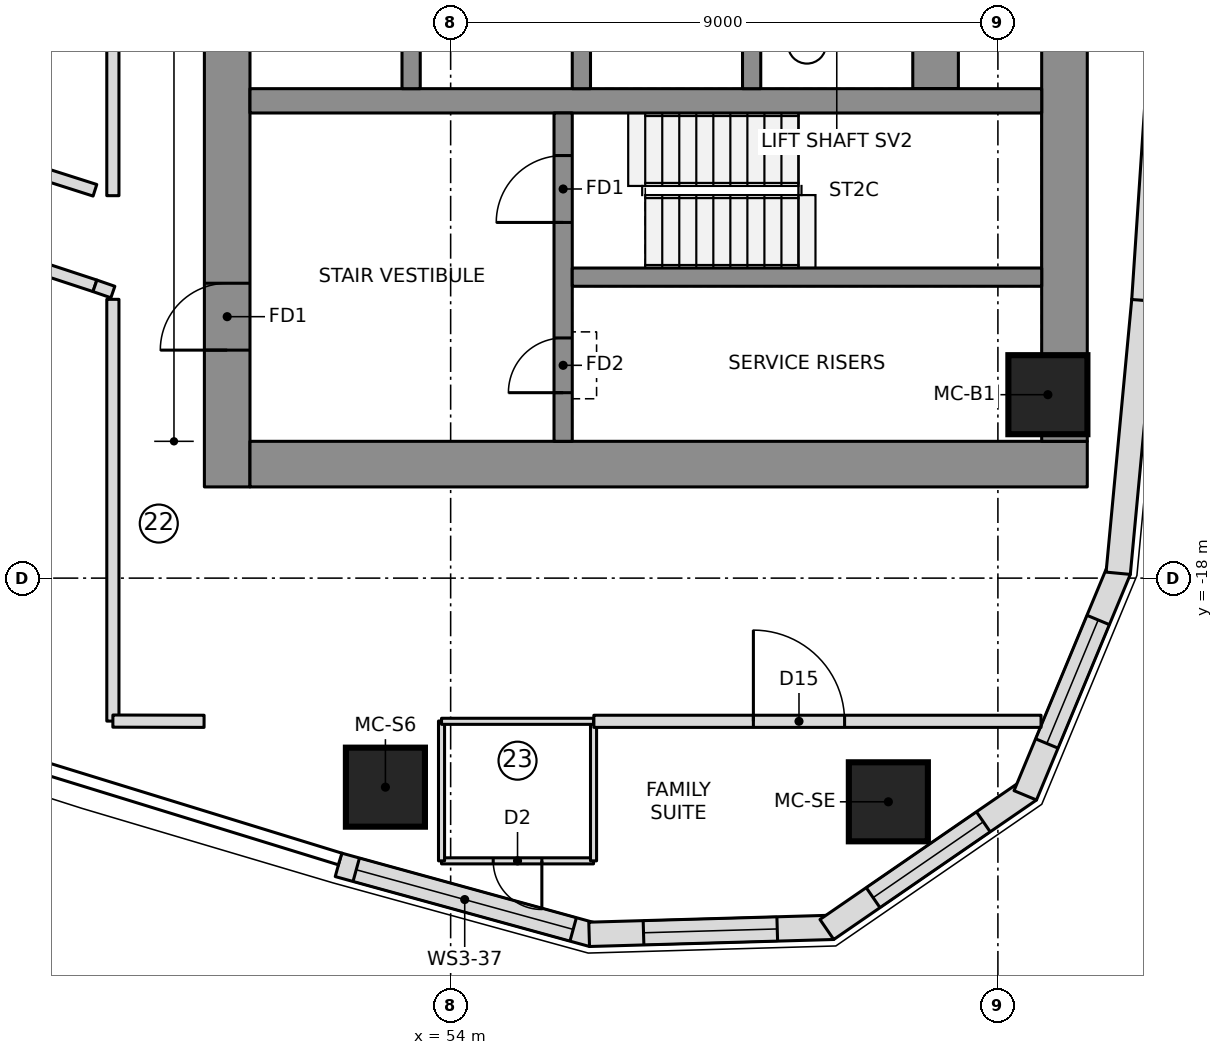
"""IFC4 building model, lengths in metres.
Left out: names, types, materials, properties, quantities, classifications, styles, units other than length and angle.
Written with IfcOpenShell. Run it as: python <this file> out.ifc"""

import sys

from ifc_helpers import new_model, si_unit, direction, frame, frame_2d, origin, origin_2d, place, context, subcontext, project, spatial, polyline, rectangle, outline, extrude, element, fill, save


model = new_model("IFC4")
c1 = context("Model", 3, precision=1e-05, world=origin(), true_north=direction((0.0, 1.0)))
c2 = subcontext(c1, "Body", "Model", "MODEL_VIEW")
j1 = project(units=[si_unit("LENGTHUNIT", "METRE"), si_unit("PLANEANGLEUNIT", "RADIAN")], contexts=[c1])
p1 = place(None, origin())
s1 = spatial("IfcSite", under=j1, at=p1, CompositionType="ELEMENT")
p2 = place(p1, origin())
s2 = spatial("IfcBuilding", under=s1, at=p2, CompositionType="ELEMENT")
p3 = place(p2, frame((0.0, 0.0, 179.05)))
s3 = spatial("IfcBuildingStorey", under=s2, at=p3, CompositionType="ELEMENT", Elevation=179.05)
p4 = place(p3, frame((50.325, -16.5, 0.0), z_axis=(0.0, 0.0, 1.0), x_axis=(0.0, 1.0, 0.0)))
e1 = element("IfcWall", 1, at=p4, inside=s3, PredefinedType="SHEAR", context=c2, shape_type="SweptSolid", body=[
    extrude(rectangle(XDim=9.85, YDim=0.75, at=frame_2d((4.925, 0.0))), origin(), (0.0, 0.0, 1.0), 3.55),
])
p5 = place(p4, frame((2.25, 0.0, 0.0)))
e2 = element("IfcOpeningElement", 2, at=p5, cuts=e1, PredefinedType="OPENING", context=c2, shape_type="SweptSolid", body=[
    extrude(rectangle(XDim=1.1, YDim=2.1, at=frame_2d((0.55, 1.05))), frame((0.0, 0.385, 0.0), z_axis=(0.0, -1.0, 0.0), x_axis=(1.0, 0.0, 0.0)), (0.0, 0.0, 1.0), 0.77),
])
p6 = place(p3, frame((50.7, -16.125, 0.0), z_axis=(0.0, 0.0, 1.0), x_axis=(1.0, 0.0, 0.0)))
e3 = element("IfcWall", 3, at=p6, inside=s3, PredefinedType="SHEAR", context=c2, shape_type="SweptSolid", body=[
    extrude(rectangle(XDim=13.77, YDim=0.75, at=frame_2d((6.885, 0.0))), origin(), (0.0, 0.0, 1.0), 3.55),
])
p7 = place(p3, frame((64.095, -15.75, 0.0), z_axis=(0.0, 0.0, 1.0), x_axis=(0.0, 1.0, 0.0)))
e4 = element("IfcWall", 4, at=p7, inside=s3, PredefinedType="SHEAR", context=c2, shape_type="SweptSolid", body=[
    extrude(rectangle(XDim=7.651, YDim=0.75, at=frame_2d((3.825, 0.0))), origin(), (0.0, 0.0, 1.0), 3.55),
])
p8 = place(p3, frame((61.975, -9.95, 0.0), z_axis=(0.0, 0.0, 1.0), x_axis=(0.0, 1.0, 0.0)))
e5 = element("IfcWall", 5, at=p8, inside=s3, PredefinedType="SHEAR", context=c2, shape_type="SweptSolid", body=[
    extrude(rectangle(XDim=19.9, YDim=0.75, at=frame_2d((9.95, 0.0))), origin(), (0.0, 0.0, 1.0), 3.55),
])
p9 = place(p3, frame((50.7, -10.15, 0.0), z_axis=(0.0, 0.0, 1.0), x_axis=(1.0, 0.0, 0.0)))
e6 = element("IfcWall", 6, at=p9, inside=s3, PredefinedType="SHEAR", context=c2, shape_type="SweptSolid", body=[
    extrude(rectangle(XDim=13.02, YDim=0.4, at=frame_2d((6.51, 0.0))), origin(), (0.0, 0.0, 1.0), 3.55),
])
for number, where, z_axis, x_axis in (
    (7, (53.35, -9.95, 0.0), (0.0, 0.0, 1.0), (0.0, 1.0, 0.0)),
    (8, (56.15, -9.95, 0.0), (0.0, 0.0, 1.0), (0.0, 1.0, 0.0)),
    (9, (58.95, -9.95, 0.0), (0.0, 0.0, 1.0), (0.0, 1.0, 0.0)),
):
    element("IfcWall", number, at=place(p3, frame(where, z_axis=z_axis, x_axis=x_axis)), inside=s3, PredefinedType="SHEAR", context=c2, shape_type="SweptSolid", body=[
        extrude(rectangle(XDim=3.0, YDim=0.3, at=frame_2d((1.5, 0.0))), origin(), (0.0, 0.0, 1.0), 3.55),
    ])
p10 = place(p3, frame((55.85, -15.75, 0.0), z_axis=(0.0, 0.0, 1.0), x_axis=(0.0, 1.0, 0.0)))
e10 = element("IfcWall", 10, at=p10, inside=s3, PredefinedType="SHEAR", context=c2, shape_type="SweptSolid", body=[
    extrude(rectangle(XDim=5.4, YDim=0.3, at=frame_2d((2.7, 0.0))), origin(), (0.0, 0.0, 1.0), 3.55),
])
p11 = place(p10, frame((3.6, 0.0, 0.0)))
e11 = element("IfcOpeningElement", 11, at=p11, cuts=e10, PredefinedType="OPENING", context=c2, shape_type="SweptSolid", body=[
    extrude(rectangle(XDim=1.1, YDim=2.1, at=frame_2d((0.55, 1.05))), frame((0.0, 0.16, 0.0), z_axis=(0.0, -1.0, 0.0), x_axis=(1.0, 0.0, 0.0)), (0.0, 0.0, 1.0), 0.32),
])
p12 = place(p10, frame((0.8, 0.0, 0.0)))
e12 = element("IfcOpeningElement", 12, at=p12, cuts=e10, PredefinedType="OPENING", context=c2, shape_type="SweptSolid", body=[
    extrude(rectangle(XDim=0.9, YDim=2.1, at=frame_2d((0.45, 1.05))), frame((0.0, 0.16, 0.0), z_axis=(0.0, -1.0, 0.0), x_axis=(1.0, 0.0, 0.0)), (0.0, 0.0, 1.0), 0.32),
])
p13 = place(p3, frame((56.0, -13.05, 0.0), z_axis=(0.0, 0.0, 1.0), x_axis=(1.0, 0.0, 0.0)))
e13 = element("IfcWall", 13, at=p13, inside=s3, PredefinedType="SHEAR", context=c2, shape_type="SweptSolid", body=[
    extrude(rectangle(XDim=7.72, YDim=0.3, at=frame_2d((3.86, 0.0))), origin(), (0.0, 0.0, 1.0), 3.55),
])
for number, where, z_axis, x_axis in (
    (14, (52.927, -21.438, 0.0), (0.0, 0.0, 1.0), (1.0, 0.0, 0.0)),
    (15, (61.198, -21.679, 0.0), (0.0, 0.0, 1.0), (1.0, 0.0, 0.0)),
    (16, (63.822, -14.983, 0.0), (0.0, 0.0, 1.0), (1.0, 0.0, 0.0)),
):
    element("IfcColumn", number, at=place(p3, frame(where, z_axis=z_axis, x_axis=x_axis)), inside=s3, PredefinedType="COLUMN", context=c2, shape_type="SweptSolid", body=[
        extrude(rectangle(XDim=1.3, YDim=1.3, at=origin_2d()), origin(), (0.0, 0.0, 1.0), 3.55),
    ])
p14 = place(p3, frame((52.155, -22.716, 0.0), z_axis=(0.0, 0.0, 1.0), x_axis=(0.964205755089, -0.265155165617, 0.0)))
e17 = element("IfcWall", 17, at=p14, inside=s3, PredefinedType="NOTDEFINED", context=c2, shape_type="SweptSolid", body=[
    extrude(outline(polyline([(0.0, -0.2), (4.337, -0.2), (4.277, 0.2), (0.0, 0.2), (0.0, -0.2)])), origin(), (0.0, 0.0, 1.0), 3.25),
])
p15 = place(p14, frame((0.303, 0.0, 0.9)))
e18 = element("IfcOpeningElement", 18, at=p15, cuts=e17, PredefinedType="OPENING", context=c2, shape_type="SweptSolid", body=[
    extrude(rectangle(XDim=3.7, YDim=1.8, at=frame_2d((1.85, 0.9))), frame((0.0, 0.21, 0.0), z_axis=(0.0, -1.0, 0.0), x_axis=(1.0, 0.0, 0.0)), (0.0, 0.0, 1.0), 0.42),
])
p16 = place(p3, frame((56.308, -23.858, 0.0), z_axis=(0.0, 0.0, 1.0), x_axis=(0.999587920197, 0.028705222472, 0.0)))
e19 = element("IfcWall", 19, at=p16, inside=s3, PredefinedType="NOTDEFINED", context=c2, shape_type="SweptSolid", body=[
    extrude(outline(polyline([(-0.03, -0.2), (3.989, -0.2), (3.87, 0.2), (0.03, 0.2), (-0.03, -0.2)])), origin(), (0.0, 0.0, 1.0), 3.25),
])
p17 = place(p16, frame((0.865, 0.0, 0.6)))
e20 = element("IfcOpeningElement", 20, at=p17, cuts=e19, PredefinedType="OPENING", context=c2, shape_type="SweptSolid", body=[
    extrude(outline(polyline([(0.0, 1.35), (0.084, 1.771), (0.322, 2.128), (0.679, 2.366), (1.1, 2.45), (1.521, 2.366), (1.878, 2.128), (2.116, 1.771), (2.2, 1.35), (2.2, 1.1), (2.116, 0.679), (1.878, 0.322), (1.521, 0.084), (1.1, 0.0), (0.679, 0.084), (0.322, 0.322), (0.084, 0.679), (0.0, 1.1), (0.0, 1.35)])), frame((0.0, 0.21, 0.0), z_axis=(0.0, -1.0, 0.0), x_axis=(1.0, 0.0, 0.0)), (0.0, 0.0, 1.0), 0.42),
])
p18 = place(p3, frame((60.236, -23.745, 0.0), z_axis=(0.0, 0.0, 1.0), x_axis=(0.823806162588, 0.566871596115, 0.0)))
e21 = element("IfcWall", 21, at=p18, inside=s3, PredefinedType="NOTDEFINED", context=c2, shape_type="SweptSolid", body=[
    extrude(outline(polyline([(-0.059, -0.2), (3.988, -0.2), (3.87, 0.2), (0.059, 0.2), (-0.059, -0.2)])), origin(), (0.0, 0.0, 1.0), 3.25),
])
p19 = place(p18, frame((0.865, 0.0, 0.6)))
e22 = element("IfcOpeningElement", 22, at=p19, cuts=e21, PredefinedType="OPENING", context=c2, shape_type="SweptSolid", body=[
    extrude(outline(polyline([(0.0, 1.35), (0.084, 1.771), (0.322, 2.128), (0.679, 2.366), (1.1, 2.45), (1.521, 2.366), (1.878, 2.128), (2.116, 1.771), (2.2, 1.35), (2.2, 1.1), (2.116, 0.679), (1.878, 0.322), (1.521, 0.084), (1.1, 0.0), (0.679, 0.084), (0.322, 0.322), (0.084, 0.679), (0.0, 1.1), (0.0, 1.35)])), frame((0.0, 0.21, 0.0), z_axis=(0.0, -1.0, 0.0), x_axis=(1.0, 0.0, 0.0)), (0.0, 0.0, 1.0), 0.42),
])
p20 = place(p3, frame((63.472, -21.518, 0.0), z_axis=(0.0, 0.0, 1.0), x_axis=(0.383997619794, 0.923334082547, 0.0)))
e23 = element("IfcWall", 23, at=p20, inside=s3, PredefinedType="NOTDEFINED", context=c2, shape_type="SweptSolid", body=[
    extrude(outline(polyline([(-0.059, -0.2), (3.959, -0.2), (3.899, 0.2), (0.059, 0.2), (-0.059, -0.2)])), origin(), (0.0, 0.0, 1.0), 3.25),
])
p21 = place(p20, frame((0.865, 0.0, 0.6)))
e24 = element("IfcOpeningElement", 24, at=p21, cuts=e23, PredefinedType="OPENING", context=c2, shape_type="SweptSolid", body=[
    extrude(outline(polyline([(0.0, 1.35), (0.084, 1.771), (0.322, 2.128), (0.679, 2.366), (1.1, 2.45), (1.521, 2.366), (1.878, 2.128), (2.116, 1.771), (2.2, 1.35), (2.2, 1.1), (2.116, 0.679), (1.878, 0.322), (1.521, 0.084), (1.1, 0.0), (0.679, 0.084), (0.322, 0.322), (0.084, 0.679), (0.0, 1.1), (0.0, 1.35)])), frame((0.0, 0.21, 0.0), z_axis=(0.0, -1.0, 0.0), x_axis=(1.0, 0.0, 0.0)), (0.0, 0.0, 1.0), 0.42),
])
p22 = place(p3, frame((64.981, -17.89, 0.0), z_axis=(0.0, 0.0, 1.0), x_axis=(0.093605694738, 0.995609348044, 0.0)))
e25 = element("IfcWall", 25, at=p22, inside=s3, PredefinedType="NOTDEFINED", context=c2, shape_type="SweptSolid", body=[
    extrude(outline(polyline([(-0.03, -0.2), (4.484, -0.2), (4.478, 0.2), (0.03, 0.2), (-0.03, -0.2)])), origin(), (0.0, 0.0, 1.0), 3.25),
])
p23 = place(p3, frame((65.401, -13.429, 0.0), z_axis=(0.0, 0.0, 1.0), x_axis=(0.066905935948, 0.997759287471, 0.0)))
e26 = element("IfcWall", 26, at=p23, inside=s3, PredefinedType="NOTDEFINED", context=c2, shape_type="SweptSolid", body=[
    extrude(outline(polyline([(-0.003, -0.2), (4.484, -0.2), (4.478, 0.2), (0.003, 0.2), (-0.003, -0.2)])), origin(), (0.0, 0.0, 1.0), 3.25),
])
p24 = place(p3, frame((56.35, -22.65, 0.0), z_axis=(0.0, 0.0, 1.0), x_axis=(-1.0, 0.0, 0.0)))
e27 = element("IfcWall", 27, at=p24, inside=s3, PredefinedType="PARTITIONING", context=c2, shape_type="SweptSolid", body=[
    extrude(rectangle(XDim=2.5, YDim=0.1, at=frame_2d((1.25, 0.0))), origin(), (0.0, 0.0, 1.0), 3.25),
])
p25 = place(p24, frame((0.85, 0.0, 0.0)))
e28 = element("IfcOpeningElement", 28, at=p25, cuts=e27, PredefinedType="OPENING", context=c2, shape_type="SweptSolid", body=[
    extrude(rectangle(XDim=0.8, YDim=2.1, at=frame_2d((0.4, 1.05))), frame((0.0, 0.06, 0.0), z_axis=(0.0, -1.0, 0.0), x_axis=(1.0, 0.0, 0.0)), (0.0, 0.0, 1.0), 0.12),
])
for number, where, z_axis, x_axis in (
    (29, (53.85, -22.65, 0.0), (0.0, 0.0, 1.0), (0.0, 1.0, 0.0)),
    (30, (56.35, -20.35, 0.0), (0.0, 0.0, 1.0), (0.0, -1.0, 0.0)),
):
    element("IfcWall", number, at=place(p3, frame(where, z_axis=z_axis, x_axis=x_axis)), inside=s3, PredefinedType="PARTITIONING", context=c2, shape_type="SweptSolid", body=[
        extrude(rectangle(XDim=2.3, YDim=0.1, at=frame_2d((1.15, 0.0))), origin(), (0.0, 0.0, 1.0), 3.25),
    ])
p26 = place(p3, frame((56.355, -20.355, 0.0), z_axis=(0.0, 0.0, 1.0), x_axis=(1.0, 0.0, 0.0)))
e31 = element("IfcWall", 31, at=p26, inside=s3, PredefinedType="PARTITIONING", context=c2, shape_type="SweptSolid", body=[
    extrude(rectangle(XDim=7.354, YDim=0.2, at=frame_2d((3.677, 0.0))), origin(), (0.0, 0.0, 1.0), 3.25),
])
p27 = place(p26, frame((2.624, 0.0, 0.0)))
e32 = element("IfcOpeningElement", 32, at=p27, cuts=e31, PredefinedType="OPENING", context=c2, shape_type="SweptSolid", body=[
    extrude(rectangle(XDim=1.5, YDim=2.1, at=frame_2d((0.75, 1.05))), frame((0.0, 0.11, 0.0), z_axis=(0.0, -1.0, 0.0), x_axis=(1.0, 0.0, 0.0)), (0.0, 0.0, 1.0), 0.22),
])
p28 = place(p3, frame((53.85, -20.355, 0.0), z_axis=(0.0, 0.0, 1.0), x_axis=(1.0, 0.0, 0.0)))
e33 = element("IfcWall", 33, at=p28, inside=s3, PredefinedType="PARTITIONING", context=c2, shape_type="SweptSolid", body=[
    extrude(rectangle(XDim=2.5, YDim=0.1, at=frame_2d((1.25, 0.0))), origin(), (0.0, 0.0, 1.0), 3.25),
])
p29 = place(p3, frame((43.026, -11.507, 0.0), z_axis=(0.0, 0.0, 1.0), x_axis=(0.949951949432, -0.312396052744, 0.0)))
e34 = element("IfcWall", 34, at=p29, inside=s3, PredefinedType="PARTITIONING", context=c2, shape_type="SweptSolid", body=[
    extrude(rectangle(XDim=5.394, YDim=0.2, at=frame_2d((2.697, 0.0))), origin(), (0.0, 0.0, 1.0), 3.25),
])
p30 = place(p29, frame((3.05, 0.0, 0.0)))
e35 = element("IfcOpeningElement", 35, at=p30, cuts=e34, PredefinedType="OPENING", context=c2, shape_type="SweptSolid", body=[
    extrude(rectangle(XDim=1.0, YDim=2.1, at=frame_2d((0.5, 1.05))), frame((0.0, 0.11, 0.0), z_axis=(0.0, -1.0, 0.0), x_axis=(1.0, 0.0, 0.0)), (0.0, 0.0, 1.0), 0.22),
])
p31 = place(p3, frame((48.15, -11.621, 0.0), z_axis=(0.0, 0.0, 1.0), x_axis=(-0.952761948983, 0.303718074157, 0.0)))
e36 = element("IfcWall", 36, at=p31, inside=s3, PredefinedType="PARTITIONING", context=c2, shape_type="SweptSolid", body=[
    extrude(rectangle(XDim=1.332, YDim=0.2, at=frame_2d((0.666, 0.0))), origin(), (0.0, 0.0, 1.0), 3.25),
])
p32 = place(p3, frame((48.445, 11.71, 0.0), z_axis=(0.0, 0.0, 1.0), x_axis=(0.0, -1.0, 0.0)))
e37 = element("IfcWall", 37, at=p32, inside=s3, PredefinedType="PARTITIONING", context=c2, shape_type="SweptSolid", body=[
    extrude(rectangle(XDim=23.42, YDim=0.2, at=frame_2d((11.71, 0.0))), origin(), (0.0, 0.0, 1.0), 3.25),
])
p33 = place(p3, frame((48.15, -13.192, 0.0), z_axis=(0.0, 0.0, 1.0), x_axis=(0.944623214561, -0.328156947987, 0.0)))
e38 = element("IfcWall", 38, at=p33, inside=s3, PredefinedType="PARTITIONING", context=c2, shape_type="SweptSolid", body=[
    extrude(rectangle(XDim=0.312, YDim=0.2, at=frame_2d((0.156, 0.0))), origin(), (0.0, 0.0, 1.0), 3.25),
])
p34 = place(p3, frame((48.445, -13.415, 0.0), z_axis=(0.0, 0.0, 1.0), x_axis=(3.5195157e-05, -0.999999999381, 0.0)))
e39 = element("IfcWall", 39, at=p34, inside=s3, PredefinedType="PARTITIONING", context=c2, shape_type="SweptSolid", body=[
    extrude(rectangle(XDim=6.937, YDim=0.2, at=frame_2d((3.468, 0.0))), origin(), (0.0, 0.0, 1.0), 3.25),
])
p35 = place(p3, frame((48.445, -20.352, 0.0), z_axis=(0.0, 0.0, 1.0), x_axis=(0.999997403051, -0.002279010849, 0.0)))
e40 = element("IfcWall", 40, at=p35, inside=s3, PredefinedType="PARTITIONING", context=c2, shape_type="SweptSolid", body=[
    extrude(rectangle(XDim=1.5, YDim=0.2, at=frame_2d((0.75, 0.0))), origin(), (0.0, 0.0, 1.0), 3.25),
])
p36 = place(p15, origin())
e41 = element("IfcWindow", 41, at=p36, inside=s3, PartitioningType="SINGLE_PANEL", PredefinedType="WINDOW", context=c2, shape_type="SweptSolid", body=[
    extrude(rectangle(XDim=3.7, YDim=1.8, at=frame_2d((1.85, 0.9))), frame((0.0, 0.17, 0.0), z_axis=(0.0, -1.0, 0.0), x_axis=(1.0, 0.0, 0.0)), (0.0, 0.0, 1.0), 0.06),
])
fill(e18, e41)
p37 = place(p17, origin())
e42 = element("IfcWindow", 42, at=p37, inside=s3, PartitioningType="SINGLE_PANEL", PredefinedType="WINDOW", context=c2, shape_type="SweptSolid", body=[
    extrude(outline(polyline([(0.0, 1.35), (0.084, 1.771), (0.322, 2.128), (0.679, 2.366), (1.1, 2.45), (1.521, 2.366), (1.878, 2.128), (2.116, 1.771), (2.2, 1.35), (2.2, 1.1), (2.116, 0.679), (1.878, 0.322), (1.521, 0.084), (1.1, 0.0), (0.679, 0.084), (0.322, 0.322), (0.084, 0.679), (0.0, 1.1), (0.0, 1.35)])), frame((0.0, 0.17, 0.0), z_axis=(0.0, -1.0, 0.0), x_axis=(1.0, 0.0, 0.0)), (0.0, 0.0, 1.0), 0.06),
])
fill(e20, e42)
p38 = place(p19, origin())
e43 = element("IfcWindow", 43, at=p38, inside=s3, PartitioningType="SINGLE_PANEL", PredefinedType="WINDOW", context=c2, shape_type="SweptSolid", body=[
    extrude(outline(polyline([(0.0, 1.35), (0.084, 1.771), (0.322, 2.128), (0.679, 2.366), (1.1, 2.45), (1.521, 2.366), (1.878, 2.128), (2.116, 1.771), (2.2, 1.35), (2.2, 1.1), (2.116, 0.679), (1.878, 0.322), (1.521, 0.084), (1.1, 0.0), (0.679, 0.084), (0.322, 0.322), (0.084, 0.679), (0.0, 1.1), (0.0, 1.35)])), frame((0.0, 0.17, 0.0), z_axis=(0.0, -1.0, 0.0), x_axis=(1.0, 0.0, 0.0)), (0.0, 0.0, 1.0), 0.06),
])
fill(e22, e43)
p39 = place(p21, origin())
e44 = element("IfcWindow", 44, at=p39, inside=s3, PartitioningType="SINGLE_PANEL", PredefinedType="WINDOW", context=c2, shape_type="SweptSolid", body=[
    extrude(outline(polyline([(0.0, 1.35), (0.084, 1.771), (0.322, 2.128), (0.679, 2.366), (1.1, 2.45), (1.521, 2.366), (1.878, 2.128), (2.116, 1.771), (2.2, 1.35), (2.2, 1.1), (2.116, 0.679), (1.878, 0.322), (1.521, 0.084), (1.1, 0.0), (0.679, 0.084), (0.322, 0.322), (0.084, 0.679), (0.0, 1.1), (0.0, 1.35)])), frame((0.0, 0.17, 0.0), z_axis=(0.0, -1.0, 0.0), x_axis=(1.0, 0.0, 0.0)), (0.0, 0.0, 1.0), 0.06),
])
fill(e24, e44)
p40 = place(p25, origin())
e45 = element("IfcDoor", 45, at=p40, inside=s3, OperationType="SINGLE_SWING_LEFT", PredefinedType="DOOR", context=c2, shape_type="SweptSolid", body=[
    extrude(rectangle(XDim=0.8, YDim=2.1, at=frame_2d((0.4, 1.05))), frame((0.0, 0.025, 0.0), z_axis=(0.0, -1.0, 0.0), x_axis=(1.0, 0.0, 0.0)), (0.0, 0.0, 1.0), 0.05),
])
fill(e28, e45)
p41 = place(p27, origin())
e46 = element("IfcDoor", 46, at=p41, inside=s3, OperationType="DOUBLE_DOOR_SINGLE_SWING", PredefinedType="DOOR", context=c2, shape_type="SweptSolid", body=[
    extrude(rectangle(XDim=1.5, YDim=2.1, at=frame_2d((0.75, 1.05))), frame((0.0, 0.025, 0.0), z_axis=(0.0, -1.0, 0.0), x_axis=(1.0, 0.0, 0.0)), (0.0, 0.0, 1.0), 0.05),
])
fill(e32, e46)
p42 = place(p11, origin())
e47 = element("IfcDoor", 47, at=p42, inside=s3, OperationType="SINGLE_SWING_RIGHT", PredefinedType="DOOR", context=c2, shape_type="SweptSolid", body=[
    extrude(rectangle(XDim=1.1, YDim=2.1, at=frame_2d((0.55, 1.05))), frame((0.0, 0.025, 0.0), z_axis=(0.0, -1.0, 0.0), x_axis=(1.0, 0.0, 0.0)), (0.0, 0.0, 1.0), 0.05),
])
fill(e11, e47)
p43 = place(p5, origin())
e48 = element("IfcDoor", 48, at=p43, inside=s3, OperationType="SINGLE_SWING_RIGHT", PredefinedType="DOOR", context=c2, shape_type="SweptSolid", body=[
    extrude(rectangle(XDim=1.1, YDim=2.1, at=frame_2d((0.55, 1.05))), frame((0.0, 0.025, 0.0), z_axis=(0.0, -1.0, 0.0), x_axis=(1.0, 0.0, 0.0)), (0.0, 0.0, 1.0), 0.05),
])
fill(e2, e48)
p44 = place(p12, origin())
e49 = element("IfcDoor", 49, at=p44, inside=s3, OperationType="SINGLE_SWING_LEFT", PredefinedType="DOOR", context=c2, shape_type="SweptSolid", body=[
    extrude(rectangle(XDim=0.9, YDim=2.1, at=frame_2d((0.45, 1.05))), frame((0.0, 0.025, 0.0), z_axis=(0.0, -1.0, 0.0), x_axis=(1.0, 0.0, 0.0)), (0.0, 0.0, 1.0), 0.05),
])
fill(e12, e49)
save(model, sys.argv[1])
